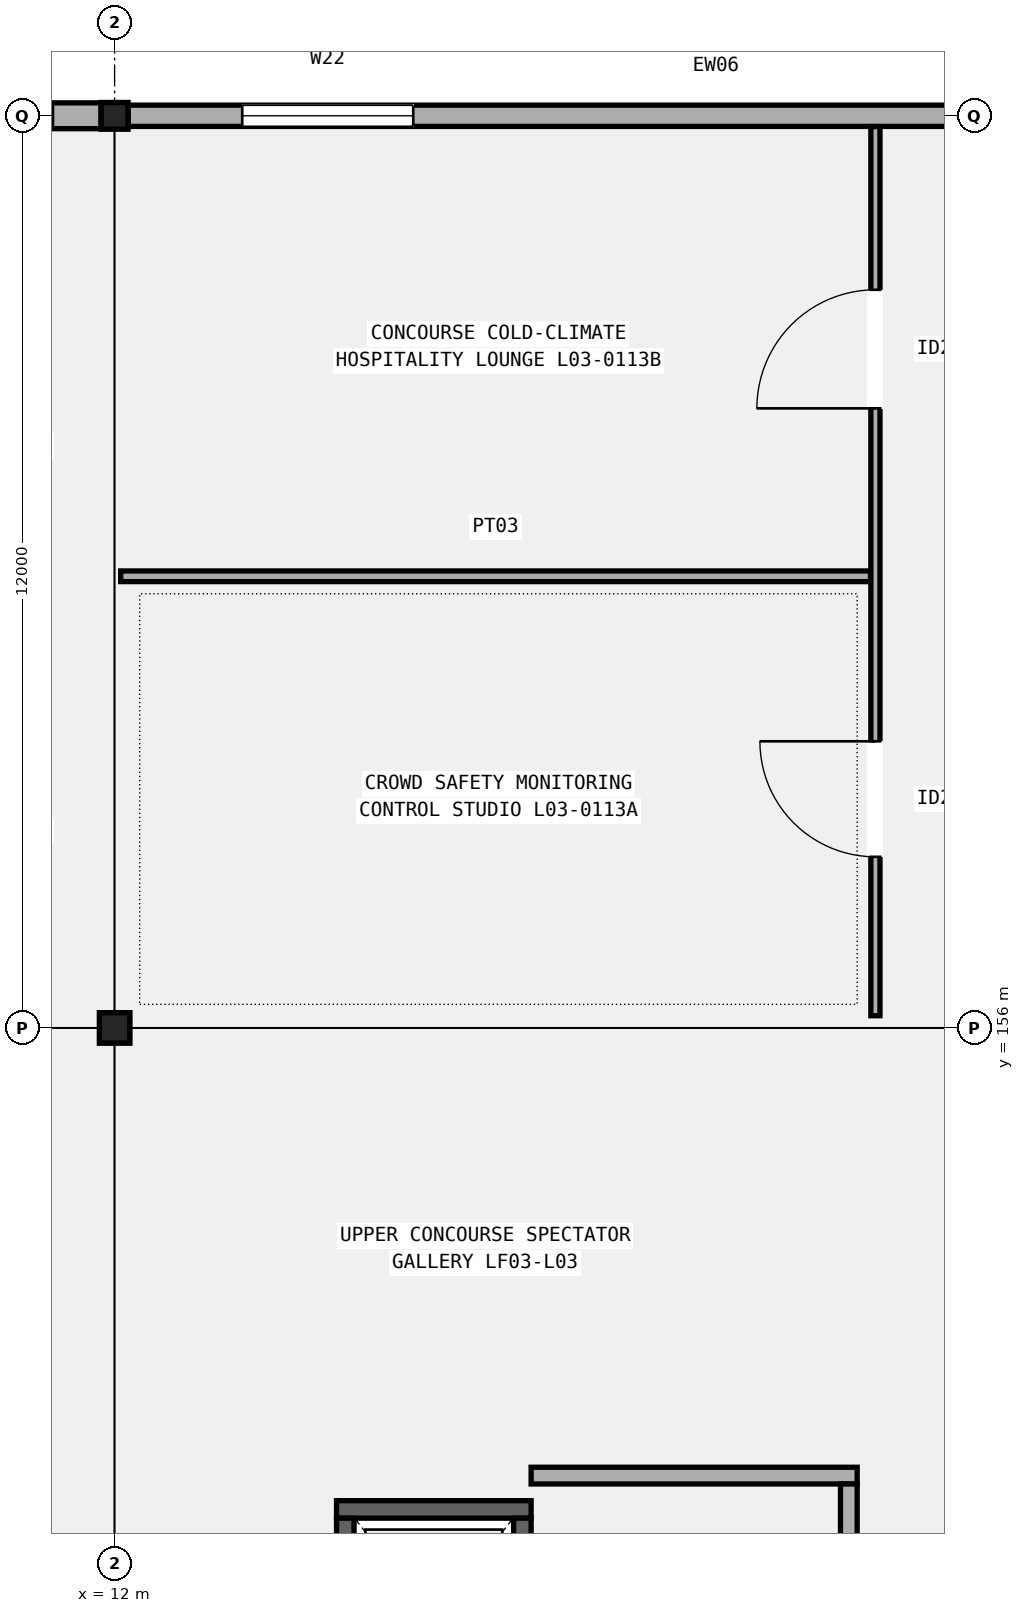
"""IFC4 building model, lengths in metres.
Left out: names, types, materials, properties, quantities, classifications, styles, units other than length and angle.
Written with IfcOpenShell. Run it as: python <this file> out.ifc"""

import sys

from ifc_helpers import new_model, si_unit, direction, frame, frame_2d, origin, origin_2d, place, context, subcontext, project, spatial, rectangle, hollow_rectangle, extrude, element, fill, save


model = new_model("IFC4")
c1 = context("Model", 3, precision=1e-05, world=origin(), true_north=direction((0.0, 1.0)))
c2 = subcontext(c1, "Body", "Model", "MODEL_VIEW")
j1 = project(units=[si_unit("LENGTHUNIT", "METRE"), si_unit("PLANEANGLEUNIT", "RADIAN")], contexts=[c1])
p1 = place(None, origin())
s1 = spatial("IfcSite", under=j1, at=p1, CompositionType="ELEMENT")
p2 = place(p1, origin())
s2 = spatial("IfcBuilding", under=s1, at=p2, CompositionType="ELEMENT")
p3 = place(p2, frame((0.0, 0.0, 15.3)))
s3 = spatial("IfcBuildingStorey", under=s2, at=p3, CompositionType="ELEMENT", Elevation=15.3)
p4 = place(p3, frame((12.0, 156.0, 0.0), z_axis=(0.0, 0.0, 1.0), x_axis=(1.0, 0.0, 0.0)))
e1 = element("IfcColumn", 1, at=p4, inside=s3, PredefinedType="COLUMN", context=c2, shape_type="SweptSolid", body=[
    extrude(hollow_rectangle(XDim=0.4, YDim=0.4, WallThickness=0.016, InnerFilletRadius=0.016, OuterFilletRadius=0.032, at=origin_2d()), origin(), (0.0, 0.0, 1.0), 5.1),
])
p5 = place(p3, frame((12.0, 168.0, 0.0), z_axis=(0.0, 0.0, 1.0), x_axis=(1.0, 0.0, 0.0)))
e2 = element("IfcColumn", 2, at=p5, inside=s3, PredefinedType="COLUMN", context=c2, shape_type="SweptSolid", body=[
    extrude(hollow_rectangle(XDim=0.35, YDim=0.35, WallThickness=0.016, InnerFilletRadius=0.016, OuterFilletRadius=0.032, at=origin_2d()), origin(), (0.0, 0.0, 1.0), 5.1),
])
p6 = place(p3, frame((11.171, 168.0, 0.0), z_axis=(0.0, 0.0, 1.0), x_axis=(1.0, 0.0, 0.0)))
e3 = element("IfcWall", 3, at=p6, inside=s3, PredefinedType="SOLIDWALL", context=c2, shape_type="SweptSolid", body=[
    extrude(rectangle(XDim=0.65, YDim=0.34, at=frame_2d((0.325, 0.0))), origin(), (0.0, 0.0, 1.0), 4.172),
])
p7 = place(p3, frame((12.179, 168.0, 0.0), z_axis=(0.0, 0.0, 1.0), x_axis=(1.0, 0.0, 0.0)))
e4 = element("IfcWall", 4, at=p7, inside=s3, PredefinedType="SOLIDWALL", context=c2, shape_type="SweptSolid", body=[
    extrude(rectangle(XDim=11.417, YDim=0.28, at=frame_2d((5.708, 0.0))), origin(), (0.0, 0.0, 1.0), 4.06),
])
p8 = place(p7, frame((1.5, 0.0, 0.95)))
e5 = element("IfcOpeningElement", 5, at=p8, cuts=e4, PredefinedType="OPENING", context=c2, shape_type="SweptSolid", body=[
    extrude(rectangle(XDim=2.25, YDim=2.2, at=frame_2d((1.125, 1.1))), frame((0.0, 0.15, 0.0), z_axis=(0.0, -1.0, 0.0), x_axis=(1.0, 0.0, 0.0)), (0.0, 0.0, 1.0), 0.3),
])
p9 = place(p3, frame((14.92, 149.665, 0.0), z_axis=(0.0, 0.0, 1.0), x_axis=(1.0, 0.0, 0.0)))
e6 = element("IfcWall", 6, at=p9, inside=s3, PredefinedType="SHEAR", context=c2, shape_type="SweptSolid", body=[
    extrude(rectangle(XDim=2.56, YDim=0.23, at=frame_2d((1.28, 0.0))), origin(), (0.0, 0.0, 1.0), 4.86),
])
p10 = place(p3, frame((15.035, 146.85, 0.0), z_axis=(0.0, 0.0, 1.0), x_axis=(0.0, 1.0, 0.0)))
e7 = element("IfcWall", 7, at=p10, inside=s3, PredefinedType="SHEAR", context=c2, shape_type="SweptSolid", body=[
    extrude(rectangle(XDim=2.7, YDim=0.23, at=frame_2d((1.35, 0.0))), origin(), (0.0, 0.0, 1.0), 4.86),
])
p11 = place(p3, frame((17.365, 146.85, 0.0), z_axis=(0.0, 0.0, 1.0), x_axis=(0.0, 1.0, 0.0)))
e8 = element("IfcWall", 8, at=p11, inside=s3, PredefinedType="SHEAR", context=c2, shape_type="SweptSolid", body=[
    extrude(rectangle(XDim=2.7, YDim=0.23, at=frame_2d((1.35, 0.0))), origin(), (0.0, 0.0, 1.0), 4.86),
])
p12 = place(p11, frame((0.8, 0.0, 0.0)))
e9 = element("IfcOpeningElement", 9, at=p12, cuts=e8, PredefinedType="OPENING", context=c2, shape_type="SweptSolid", body=[
    extrude(rectangle(XDim=1.1, YDim=2.15, at=frame_2d((0.55, 1.075))), frame((0.0, 0.125, 0.0), z_axis=(0.0, -1.0, 0.0), x_axis=(1.0, 0.0, 0.0)), (0.0, 0.0, 1.0), 0.25),
])
p13 = place(p3, frame((17.48, 150.11, 0.0), z_axis=(0.0, 0.0, 1.0), x_axis=(1.0, 0.0, 0.0)))
e10 = element("IfcWall", 10, at=p13, inside=s3, PredefinedType="SOLIDWALL", context=c2, shape_type="SweptSolid", body=[
    extrude(rectangle(XDim=4.29, YDim=0.22, at=frame_2d((2.145, 0.0))), origin(), (0.0, 0.0, 1.0), 4.22),
])
p14 = place(p3, frame((21.66, 146.4, 0.0), z_axis=(0.0, 0.0, 1.0), x_axis=(0.0, 1.0, 0.0)))
e11 = element("IfcWall", 11, at=p14, inside=s3, PredefinedType="SOLIDWALL", context=c2, shape_type="SweptSolid", body=[
    extrude(rectangle(XDim=3.6, YDim=0.22, at=frame_2d((1.8, 0.0))), origin(), (0.0, 0.0, 1.0), 4.22),
])
p15 = place(p14, frame((1.15, 0.0, 0.0)))
e12 = element("IfcOpeningElement", 12, at=p15, cuts=e11, PredefinedType="OPENING", context=c2, shape_type="SweptSolid", body=[
    extrude(rectangle(XDim=1.3, YDim=2.15, at=frame_2d((0.65, 1.075))), frame((0.0, 0.12, 0.0), z_axis=(0.0, -1.0, 0.0), x_axis=(1.0, 0.0, 0.0)), (0.0, 0.0, 1.0), 0.24),
])
p16 = place(p3, frame((22.01, 156.16, 0.0), z_axis=(0.0, 0.0, 1.0), x_axis=(0.0, 1.0, 0.0)))
e13 = element("IfcWall", 13, at=p16, inside=s3, PredefinedType="PARTITIONING", context=c2, shape_type="SweptSolid", body=[
    extrude(rectangle(XDim=11.698, YDim=0.12, at=frame_2d((5.849, 0.0))), origin(), (0.0, 0.0, 1.0), 4.22),
])
p17 = place(p16, frame((2.091, 0.0, 0.0)))
e14 = element("IfcOpeningElement", 14, at=p17, cuts=e13, PredefinedType="OPENING", context=c2, shape_type="SweptSolid", body=[
    extrude(rectangle(XDim=1.52, YDim=2.28, at=frame_2d((0.76, 1.14))), frame((0.0, 0.07, 0.0), z_axis=(0.0, -1.0, 0.0), x_axis=(1.0, 0.0, 0.0)), (0.0, 0.0, 1.0), 0.14),
])
p18 = place(p16, frame((7.991, 0.0, 0.0)))
e15 = element("IfcOpeningElement", 15, at=p18, cuts=e13, PredefinedType="OPENING", context=c2, shape_type="SweptSolid", body=[
    extrude(rectangle(XDim=1.56, YDim=2.26, at=frame_2d((0.78, 1.13))), frame((0.0, 0.07, 0.0), z_axis=(0.0, -1.0, 0.0), x_axis=(1.0, 0.0, 0.0)), (0.0, 0.0, 1.0), 0.14),
])
p19 = place(p3, frame((12.08, 161.942, 0.0), z_axis=(0.0, 0.0, 1.0), x_axis=(1.0, 0.0, 0.0)))
e16 = element("IfcWall", 16, at=p19, inside=s3, PredefinedType="PARTITIONING", context=c2, shape_type="SweptSolid", body=[
    extrude(rectangle(XDim=9.865, YDim=0.14, at=frame_2d((4.933, 0.0))), origin(), (0.0, 0.0, 1.0), 4.22),
])
p20 = place(p8, origin())
e17 = element("IfcWindow", 17, at=p20, inside=s3, PartitioningType="SINGLE_PANEL", PredefinedType="WINDOW", context=c2, shape_type="SweptSolid", body=[
    extrude(rectangle(XDim=2.25, YDim=2.2, at=frame_2d((1.125, 1.1))), frame((0.0, 0.03, 0.0), z_axis=(0.0, -1.0, 0.0), x_axis=(1.0, 0.0, 0.0)), (0.0, 0.0, 1.0), 0.06),
])
fill(e5, e17)
p21 = place(p17, origin())
e18 = element("IfcDoor", 18, at=p21, inside=s3, OperationType="SINGLE_SWING_RIGHT", PredefinedType="DOOR", context=c2, shape_type="SweptSolid", body=[
    extrude(rectangle(XDim=1.52, YDim=2.28, at=frame_2d((0.76, 1.14))), frame((0.0, 0.025, 0.0), z_axis=(0.0, -1.0, 0.0), x_axis=(1.0, 0.0, 0.0)), (0.0, 0.0, 1.0), 0.05),
])
fill(e14, e18)
p22 = place(p18, origin())
e19 = element("IfcDoor", 19, at=p22, inside=s3, OperationType="SINGLE_SWING_LEFT", PredefinedType="DOOR", context=c2, shape_type="SweptSolid", body=[
    extrude(rectangle(XDim=1.56, YDim=2.26, at=frame_2d((0.78, 1.13))), frame((0.0, 0.025, 0.0), z_axis=(0.0, -1.0, 0.0), x_axis=(1.0, 0.0, 0.0)), (0.0, 0.0, 1.0), 0.05),
])
fill(e15, e19)
save(model, sys.argv[1])
